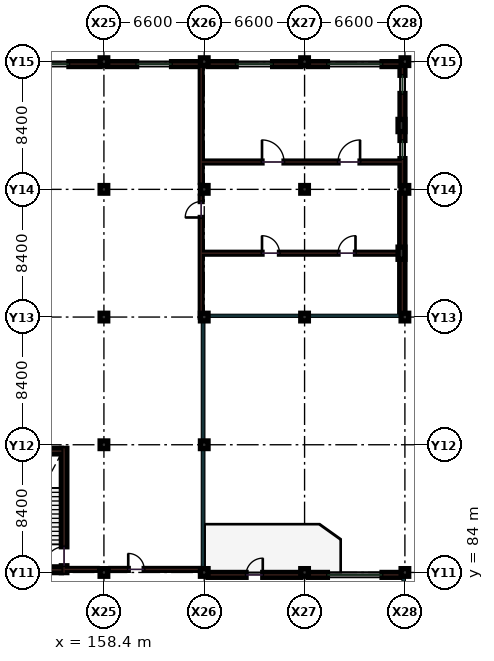
"""IFC4 building model, lengths in metres.
Left out: names, types, materials, properties, quantities, classifications, styles, units other than length and angle.
Written with IfcOpenShell. Run it as: python <this file> out.ifc"""

import sys

from ifc_helpers import new_model, si_unit, direction, frame, frame_2d, origin, origin_2d, place, context, subcontext, project, spatial, rectangle, extrude, element, fill, save


model = new_model("IFC4")
c1 = context("Model", 3, precision=1e-05, world=origin(), true_north=direction((0.0, 1.0)))
c2 = subcontext(c1, "Body", "Model", "MODEL_VIEW")
j1 = project(units=[si_unit("LENGTHUNIT", "METRE"), si_unit("PLANEANGLEUNIT", "RADIAN")], contexts=[c1])
p1 = place(None, origin())
s1 = spatial("IfcSite", under=j1, at=p1, CompositionType="ELEMENT")
p2 = place(p1, origin())
s2 = spatial("IfcBuilding", under=s1, at=p2, CompositionType="ELEMENT")
p3 = place(p2, frame((0.0, 0.0, 5.4)))
s3 = spatial("IfcBuildingStorey", under=s2, at=p3, CompositionType="ELEMENT", Elevation=5.4)
for number, where, z_axis, x_axis in (
    (1, (158.4, 84.0, 0.0), (0.0, 0.0, 1.0), (1.0, 0.0, 0.0)),
    (2, (158.4, 92.4, 0.0), (0.0, 0.0, 1.0), (1.0, 0.0, 0.0)),
    (3, (158.4, 100.8, 0.0), (0.0, 0.0, 1.0), (1.0, 0.0, 0.0)),
    (4, (158.4, 109.2, 0.0), (0.0, 0.0, 1.0), (1.0, 0.0, 0.0)),
    (5, (158.4, 117.6, 0.0), (0.0, 0.0, 1.0), (1.0, 0.0, 0.0)),
    (6, (165.0, 84.0, 0.0), (0.0, 0.0, 1.0), (1.0, 0.0, 0.0)),
    (7, (165.0, 92.4, 0.0), (0.0, 0.0, 1.0), (1.0, 0.0, 0.0)),
    (8, (165.0, 100.8, 0.0), (0.0, 0.0, 1.0), (1.0, 0.0, 0.0)),
    (9, (165.0, 109.2, 0.0), (0.0, 0.0, 1.0), (1.0, 0.0, 0.0)),
    (10, (165.0, 117.6, 0.0), (0.0, 0.0, 1.0), (1.0, 0.0, 0.0)),
    (11, (171.6, 84.0, 0.0), (0.0, 0.0, 1.0), (1.0, 0.0, 0.0)),
    (12, (171.6, 100.8, 0.0), (0.0, 0.0, 1.0), (1.0, 0.0, 0.0)),
    (13, (171.6, 109.2, 0.0), (0.0, 0.0, 1.0), (1.0, 0.0, 0.0)),
    (14, (171.6, 117.6, 0.0), (0.0, 0.0, 1.0), (1.0, 0.0, 0.0)),
    (15, (178.2, 84.0, 0.0), (0.0, 0.0, 1.0), (1.0, 0.0, 0.0)),
    (16, (178.2, 100.8, 0.0), (0.0, 0.0, 1.0), (1.0, 0.0, 0.0)),
    (17, (178.2, 109.2, 0.0), (0.0, 0.0, 1.0), (1.0, 0.0, 0.0)),
    (18, (178.2, 117.6, 0.0), (0.0, 0.0, 1.0), (1.0, 0.0, 0.0)),
):
    element("IfcColumn", number, at=place(p3, frame(where, z_axis=z_axis, x_axis=x_axis)), inside=s3, PredefinedType="COLUMN", context=c2, shape_type="SweptSolid", body=[
        extrude(rectangle(XDim=0.5, YDim=0.5, at=origin_2d()), origin(), (0.0, 0.0, 1.0), 4.5),
    ])
for number, where, z_axis, x_axis in (
    (19, (177.975, 105.0, 0.0), (0.0, 0.0, 1.0), (1.0, 0.0, 0.0)),
    (20, (177.975, 113.4, 0.0), (0.0, 0.0, 1.0), (1.0, 0.0, 0.0)),
):
    element("IfcColumn", number, at=place(p3, frame(where, z_axis=z_axis, x_axis=x_axis)), inside=s3, PredefinedType="PILASTER", context=c2, shape_type="SweptSolid", body=[
        extrude(rectangle(XDim=0.45, YDim=0.8, at=origin_2d()), origin(), (0.0, 0.0, 1.0), 4.5),
    ])
p4 = place(p3, frame((155.8, 84.2, 0.0), z_axis=(0.0, 0.0, 1.0), x_axis=(1.0, 0.0, 0.0)))
e21 = element("IfcWall", 21, at=p4, inside=s3, PredefinedType="PARTITIONING", context=c2, shape_type="SweptSolid", body=[
    extrude(rectangle(XDim=2.15, YDim=0.12, at=frame_2d((1.075, 0.0))), origin(), (0.0, 0.0, 1.0), 3.45),
])
p5 = place(p3, frame((158.85, 84.2, 0.0), z_axis=(0.0, 0.0, 1.0), x_axis=(1.0, 0.0, 0.0)))
e22 = element("IfcWall", 22, at=p5, inside=s3, PredefinedType="PARTITIONING", context=c2, shape_type="SweptSolid", body=[
    extrude(rectangle(XDim=5.83, YDim=0.12, at=frame_2d((2.915, 0.0))), origin(), (0.0, 0.0, 1.0), 3.45),
])
p6 = place(p5, frame((1.15, 0.0, 0.0)))
e23 = element("IfcOpeningElement", 23, at=p6, cuts=e22, PredefinedType="OPENING", context=c2, shape_type="SweptSolid", body=[
    extrude(rectangle(XDim=1.05, YDim=2.15, at=frame_2d((0.525, 1.075))), frame((0.0, 0.07, 0.0), z_axis=(0.0, -1.0, 0.0), x_axis=(1.0, 0.0, 0.0)), (0.0, 0.0, 1.0), 0.14),
])
p7 = place(p3, frame((164.8, 100.8, 0.0), z_axis=(0.0, 0.0, 1.0), x_axis=(0.0, 1.0, 0.0)))
e24 = element("IfcWall", 24, at=p7, inside=s3, PredefinedType="PARTITIONING", context=c2, shape_type="SweptSolid", body=[
    extrude(rectangle(XDim=7.95, YDim=0.12, at=frame_2d((3.975, 0.0))), origin(), (0.0, 0.0, 1.0), 3.45),
])
p8 = place(p7, frame((6.55, 0.0, 0.0)))
e25 = element("IfcOpeningElement", 25, at=p8, cuts=e24, PredefinedType="OPENING", context=c2, shape_type="SweptSolid", body=[
    extrude(rectangle(XDim=1.05, YDim=2.15, at=frame_2d((0.525, 1.075))), frame((0.0, 0.07, 0.0), z_axis=(0.0, -1.0, 0.0), x_axis=(1.0, 0.0, 0.0)), (0.0, 0.0, 1.0), 0.14),
])
p9 = place(p3, frame((164.8, 109.65, 0.0), z_axis=(0.0, 0.0, 1.0), x_axis=(0.0, 1.0, 0.0)))
e26 = element("IfcWall", 26, at=p9, inside=s3, PredefinedType="PARTITIONING", context=c2, shape_type="SweptSolid", body=[
    extrude(rectangle(XDim=7.63, YDim=0.12, at=frame_2d((3.815, 0.0))), origin(), (0.0, 0.0, 1.0), 3.45),
])
p10 = place(p3, frame((164.8, 105.0, 0.0), z_axis=(0.0, 0.0, 1.0), x_axis=(1.0, 0.0, 0.0)))
e27 = element("IfcWall", 27, at=p10, inside=s3, PredefinedType="PARTITIONING", context=c2, shape_type="SweptSolid", body=[
    extrude(rectangle(XDim=13.2, YDim=0.12, at=frame_2d((6.6, 0.0))), origin(), (0.0, 0.0, 1.0), 3.45),
])
p11 = place(p10, frame((4.0, 0.0, 0.0)))
e28 = element("IfcOpeningElement", 28, at=p11, cuts=e27, PredefinedType="OPENING", context=c2, shape_type="SweptSolid", body=[
    extrude(rectangle(XDim=1.15, YDim=2.2, at=frame_2d((0.575, 1.1))), frame((0.0, 0.07, 0.0), z_axis=(0.0, -1.0, 0.0), x_axis=(1.0, 0.0, 0.0)), (0.0, 0.0, 1.0), 0.14),
])
p12 = place(p10, frame((9.0, 0.0, 0.0)))
e29 = element("IfcOpeningElement", 29, at=p12, cuts=e27, PredefinedType="OPENING", context=c2, shape_type="SweptSolid", body=[
    extrude(rectangle(XDim=1.15, YDim=2.2, at=frame_2d((0.575, 1.1))), frame((0.0, 0.07, 0.0), z_axis=(0.0, -1.0, 0.0), x_axis=(1.0, 0.0, 0.0)), (0.0, 0.0, 1.0), 0.14),
])
p13 = place(p3, frame((164.8, 111.0, 0.0), z_axis=(0.0, 0.0, 1.0), x_axis=(1.0, 0.0, 0.0)))
e30 = element("IfcWall", 30, at=p13, inside=s3, PredefinedType="PARTITIONING", context=c2, shape_type="SweptSolid", body=[
    extrude(rectangle(XDim=13.2, YDim=0.12, at=frame_2d((6.6, 0.0))), origin(), (0.0, 0.0, 1.0), 3.45),
])
p14 = place(p13, frame((4.0, 0.0, 0.0)))
e31 = element("IfcOpeningElement", 31, at=p14, cuts=e30, PredefinedType="OPENING", context=c2, shape_type="SweptSolid", body=[
    extrude(rectangle(XDim=1.45, YDim=2.25, at=frame_2d((0.725, 1.125))), frame((0.0, 0.07, 0.0), z_axis=(0.0, -1.0, 0.0), x_axis=(1.0, 0.0, 0.0)), (0.0, 0.0, 1.0), 0.14),
])
p15 = place(p13, frame((9.0, 0.0, 0.0)))
e32 = element("IfcOpeningElement", 32, at=p15, cuts=e30, PredefinedType="OPENING", context=c2, shape_type="SweptSolid", body=[
    extrude(rectangle(XDim=1.45, YDim=2.25, at=frame_2d((0.725, 1.125))), frame((0.0, 0.07, 0.0), z_axis=(0.0, -1.0, 0.0), x_axis=(1.0, 0.0, 0.0)), (0.0, 0.0, 1.0), 0.14),
])
p16 = place(p3, frame((158.155, 117.44, 0.0), z_axis=(0.0, 0.0, 1.0), x_axis=(-1.0, 0.0, 0.0)))
e33 = element("IfcWall", 33, at=p16, inside=s3, PredefinedType="SOLIDWALL", context=c2, shape_type="SweptSolid", body=[
    extrude(rectangle(XDim=6.11, YDim=0.32, at=frame_2d((3.055, 0.0))), origin(), (0.0, 0.0, 1.0), 3.585),
])
p17 = place(p16, frame((2.055, 0.0, 0.95)))
e34 = element("IfcOpeningElement", 34, at=p17, cuts=e33, PredefinedType="OPENING", context=c2, shape_type="SweptSolid", body=[
    extrude(rectangle(XDim=2.0, YDim=1.95, at=frame_2d((1.0, 0.975))), frame((0.0, 0.17, 0.0), z_axis=(0.0, -1.0, 0.0), x_axis=(1.0, 0.0, 0.0)), (0.0, 0.0, 1.0), 0.34),
])
p18 = place(p3, frame((164.755, 117.44, 0.0), z_axis=(0.0, 0.0, 1.0), x_axis=(-1.0, 0.0, 0.0)))
e35 = element("IfcWall", 35, at=p18, inside=s3, PredefinedType="SOLIDWALL", context=c2, shape_type="SweptSolid", body=[
    extrude(rectangle(XDim=6.11, YDim=0.32, at=frame_2d((3.055, 0.0))), origin(), (0.0, 0.0, 1.0), 3.585),
])
p19 = place(p18, frame((1.905, 0.0, 0.95)))
e36 = element("IfcOpeningElement", 36, at=p19, cuts=e35, PredefinedType="OPENING", context=c2, shape_type="SweptSolid", body=[
    extrude(rectangle(XDim=2.3, YDim=1.95, at=frame_2d((1.15, 0.975))), frame((0.0, 0.17, 0.0), z_axis=(0.0, -1.0, 0.0), x_axis=(1.0, 0.0, 0.0)), (0.0, 0.0, 1.0), 0.34),
])
p20 = place(p3, frame((171.355, 83.84, 0.0), z_axis=(0.0, 0.0, 1.0), x_axis=(-1.0, 0.0, 0.0)))
e37 = element("IfcWall", 37, at=p20, inside=s3, PredefinedType="SOLIDWALL", context=c2, shape_type="SweptSolid", body=[
    extrude(rectangle(XDim=6.11, YDim=0.32, at=frame_2d((3.055, 0.0))), origin(), (0.0, 0.0, 1.0), 3.585),
])
p21 = place(p20, frame((2.505, 0.0, 0.0)))
e38 = element("IfcOpeningElement", 38, at=p21, cuts=e37, PredefinedType="OPENING", context=c2, shape_type="SweptSolid", body=[
    extrude(rectangle(XDim=1.1, YDim=2.2, at=frame_2d((0.55, 1.1))), frame((0.0, 0.17, 0.0), z_axis=(0.0, -1.0, 0.0), x_axis=(1.0, 0.0, 0.0)), (0.0, 0.0, 1.0), 0.34),
])
p22 = place(p3, frame((171.355, 117.44, 0.0), z_axis=(0.0, 0.0, 1.0), x_axis=(-1.0, 0.0, 0.0)))
e39 = element("IfcWall", 39, at=p22, inside=s3, PredefinedType="SOLIDWALL", context=c2, shape_type="SweptSolid", body=[
    extrude(rectangle(XDim=6.11, YDim=0.32, at=frame_2d((3.055, 0.0))), origin(), (0.0, 0.0, 1.0), 3.585),
])
p23 = place(p22, frame((1.855, 0.0, 0.95)))
e40 = element("IfcOpeningElement", 40, at=p23, cuts=e39, PredefinedType="OPENING", context=c2, shape_type="SweptSolid", body=[
    extrude(rectangle(XDim=2.4, YDim=1.6, at=frame_2d((1.2, 0.8))), frame((0.0, 0.17, 0.0), z_axis=(0.0, -1.0, 0.0), x_axis=(1.0, 0.0, 0.0)), (0.0, 0.0, 1.0), 0.34),
])
p24 = place(p3, frame((177.955, 83.84, 0.0), z_axis=(0.0, 0.0, 1.0), x_axis=(-1.0, 0.0, 0.0)))
e41 = element("IfcWall", 41, at=p24, inside=s3, PredefinedType="SOLIDWALL", context=c2, shape_type="SweptSolid", body=[
    extrude(rectangle(XDim=6.11, YDim=0.32, at=frame_2d((3.055, 0.0))), origin(), (0.0, 0.0, 1.0), 3.585),
])
p25 = place(p24, frame((1.255, 0.0, 0.95)))
e42 = element("IfcOpeningElement", 42, at=p25, cuts=e41, PredefinedType="OPENING", context=c2, shape_type="SweptSolid", body=[
    extrude(rectangle(XDim=3.6, YDim=2.0, at=frame_2d((1.8, 1.0))), frame((0.0, 0.17, 0.0), z_axis=(0.0, -1.0, 0.0), x_axis=(1.0, 0.0, 0.0)), (0.0, 0.0, 1.0), 0.34),
])
p26 = place(p3, frame((178.03, 101.045, 0.0), z_axis=(0.0, 0.0, 1.0), x_axis=(0.0, 1.0, 0.0)))
e43 = element("IfcWall", 43, at=p26, inside=s3, PredefinedType="SHEAR", context=c2, shape_type="SweptSolid", body=[
    extrude(rectangle(XDim=7.91, YDim=0.34, at=frame_2d((3.955, 0.0))), origin(), (0.0, 0.0, 1.0), 4.2),
])
p27 = place(p3, frame((178.04, 109.445, 0.0), z_axis=(0.0, 0.0, 1.0), x_axis=(0.0, 1.0, 0.0)))
e44 = element("IfcWall", 44, at=p27, inside=s3, PredefinedType="SOLIDWALL", context=c2, shape_type="SweptSolid", body=[
    extrude(rectangle(XDim=7.91, YDim=0.32, at=frame_2d((3.955, 0.0))), origin(), (0.0, 0.0, 1.0), 3.635),
])
p28 = place(p27, frame((1.775, 0.0, 0.95)))
e45 = element("IfcOpeningElement", 45, at=p28, cuts=e44, PredefinedType="OPENING", context=c2, shape_type="SweptSolid", body=[
    extrude(rectangle(XDim=1.2, YDim=1.5, at=frame_2d((0.6, 0.75))), frame((0.0, 0.17, 0.0), z_axis=(0.0, -1.0, 0.0), x_axis=(1.0, 0.0, 0.0)), (0.0, 0.0, 1.0), 0.34),
])
p29 = place(p27, frame((6.06, 0.0, 0.95)))
e46 = element("IfcOpeningElement", 46, at=p29, cuts=e44, PredefinedType="OPENING", context=c2, shape_type="SweptSolid", body=[
    extrude(rectangle(XDim=1.2, YDim=1.5, at=frame_2d((0.6, 0.75))), frame((0.0, 0.17, 0.0), z_axis=(0.0, -1.0, 0.0), x_axis=(1.0, 0.0, 0.0)), (0.0, 0.0, 1.0), 0.34),
])
p30 = place(p3, frame((177.955, 117.44, 0.0), z_axis=(0.0, 0.0, 1.0), x_axis=(-1.0, 0.0, 0.0)))
e47 = element("IfcWall", 47, at=p30, inside=s3, PredefinedType="SOLIDWALL", context=c2, shape_type="SweptSolid", body=[
    extrude(rectangle(XDim=6.11, YDim=0.32, at=frame_2d((3.055, 0.0))), origin(), (0.0, 0.0, 1.0), 3.585),
])
p31 = place(p30, frame((1.255, 0.0, 0.95)))
e48 = element("IfcOpeningElement", 48, at=p31, cuts=e47, PredefinedType="OPENING", context=c2, shape_type="SweptSolid", body=[
    extrude(rectangle(XDim=3.6, YDim=2.0, at=frame_2d((1.8, 1.0))), frame((0.0, 0.17, 0.0), z_axis=(0.0, -1.0, 0.0), x_axis=(1.0, 0.0, 0.0)), (0.0, 0.0, 1.0), 0.34),
])
p32 = place(p3, frame((155.78, 83.99, 0.0), z_axis=(0.0, 0.0, 1.0), x_axis=(0.0, 1.0, 0.0)))
e49 = element("IfcWall", 49, at=p32, inside=s3, PredefinedType="SHEAR", context=c2, shape_type="SweptSolid", body=[
    extrude(rectangle(XDim=8.17, YDim=0.36, at=frame_2d((4.085, 0.0))), origin(), (0.0, 0.0, 1.0), 4.2),
])
p33 = place(p32, frame((0.45, 0.0, 0.0)))
e50 = element("IfcOpeningElement", 50, at=p33, cuts=e49, PredefinedType="OPENING", context=c2, shape_type="SweptSolid", body=[
    extrude(rectangle(XDim=1.25, YDim=2.15, at=frame_2d((0.625, 1.075))), frame((0.0, 0.19, 0.0), z_axis=(0.0, -1.0, 0.0), x_axis=(1.0, 0.0, 0.0)), (0.0, 0.0, 1.0), 0.38),
])
for number, where, z_axis, x_axis in (
    (51, (152.4, 91.98, 0.0), (0.0, 0.0, 1.0), (1.0, 0.0, 0.0)),
    (52, (152.4, 84.17, 0.0), (0.0, 0.0, 1.0), (1.0, 0.0, 0.0)),
):
    element("IfcWall", number, at=place(p3, frame(where, z_axis=z_axis, x_axis=x_axis)), inside=s3, PredefinedType="SHEAR", context=c2, shape_type="SweptSolid", body=[
        extrude(rectangle(XDim=3.2, YDim=0.36, at=frame_2d((1.6, 0.0))), origin(), (0.0, 0.0, 1.0), 4.2),
    ])
p34 = place(p6, origin())
e53 = element("IfcDoor", 53, at=p34, inside=s3, OperationType="SINGLE_SWING_LEFT", PredefinedType="DOOR", context=c2, shape_type="SweptSolid", body=[
    extrude(rectangle(XDim=1.05, YDim=2.15, at=frame_2d((0.525, 1.075))), frame((0.0, 0.025, 0.0), z_axis=(0.0, -1.0, 0.0), x_axis=(1.0, 0.0, 0.0)), (0.0, 0.0, 1.0), 0.05),
])
fill(e23, e53)
p35 = place(p8, origin())
e54 = element("IfcDoor", 54, at=p35, inside=s3, OperationType="SINGLE_SWING_LEFT", PredefinedType="DOOR", context=c2, shape_type="SweptSolid", body=[
    extrude(rectangle(XDim=1.05, YDim=2.15, at=frame_2d((0.525, 1.075))), frame((0.0, 0.025, 0.0), z_axis=(0.0, -1.0, 0.0), x_axis=(1.0, 0.0, 0.0)), (0.0, 0.0, 1.0), 0.05),
])
fill(e25, e54)
p36 = place(p11, origin())
e55 = element("IfcDoor", 55, at=p36, inside=s3, OperationType="SINGLE_SWING_LEFT", PredefinedType="DOOR", context=c2, shape_type="SweptSolid", body=[
    extrude(rectangle(XDim=1.15, YDim=2.2, at=frame_2d((0.575, 1.1))), frame((0.0, 0.025, 0.0), z_axis=(0.0, -1.0, 0.0), x_axis=(1.0, 0.0, 0.0)), (0.0, 0.0, 1.0), 0.05),
])
fill(e28, e55)
p37 = place(p12, origin())
e56 = element("IfcDoor", 56, at=p37, inside=s3, OperationType="SINGLE_SWING_RIGHT", PredefinedType="DOOR", context=c2, shape_type="SweptSolid", body=[
    extrude(rectangle(XDim=1.15, YDim=2.2, at=frame_2d((0.575, 1.1))), frame((0.0, 0.025, 0.0), z_axis=(0.0, -1.0, 0.0), x_axis=(1.0, 0.0, 0.0)), (0.0, 0.0, 1.0), 0.05),
])
fill(e29, e56)
p38 = place(p14, origin())
e57 = element("IfcDoor", 57, at=p38, inside=s3, OperationType="SINGLE_SWING_LEFT", PredefinedType="DOOR", context=c2, shape_type="SweptSolid", body=[
    extrude(rectangle(XDim=1.45, YDim=2.25, at=frame_2d((0.725, 1.125))), frame((0.0, 0.025, 0.0), z_axis=(0.0, -1.0, 0.0), x_axis=(1.0, 0.0, 0.0)), (0.0, 0.0, 1.0), 0.05),
])
fill(e31, e57)
p39 = place(p15, origin())
e58 = element("IfcDoor", 58, at=p39, inside=s3, OperationType="SINGLE_SWING_RIGHT", PredefinedType="DOOR", context=c2, shape_type="SweptSolid", body=[
    extrude(rectangle(XDim=1.45, YDim=2.25, at=frame_2d((0.725, 1.125))), frame((0.0, 0.025, 0.0), z_axis=(0.0, -1.0, 0.0), x_axis=(1.0, 0.0, 0.0)), (0.0, 0.0, 1.0), 0.05),
])
fill(e32, e58)
p40 = place(p17, origin())
e59 = element("IfcWindow", 59, at=p40, inside=s3, PartitioningType="SINGLE_PANEL", PredefinedType="WINDOW", context=c2, shape_type="SweptSolid", body=[
    extrude(rectangle(XDim=2.0, YDim=1.95, at=frame_2d((1.0, 0.975))), frame((0.0, 0.03, 0.0), z_axis=(0.0, -1.0, 0.0), x_axis=(1.0, 0.0, 0.0)), (0.0, 0.0, 1.0), 0.06),
])
fill(e34, e59)
p41 = place(p19, origin())
e60 = element("IfcWindow", 60, at=p41, inside=s3, PartitioningType="SINGLE_PANEL", PredefinedType="WINDOW", context=c2, shape_type="SweptSolid", body=[
    extrude(rectangle(XDim=2.3, YDim=1.95, at=frame_2d((1.15, 0.975))), frame((0.0, 0.03, 0.0), z_axis=(0.0, -1.0, 0.0), x_axis=(1.0, 0.0, 0.0)), (0.0, 0.0, 1.0), 0.06),
])
fill(e36, e60)
p42 = place(p21, frame((1.1, 0.0, 0.0), z_axis=(0.0, 0.0, 1.0), x_axis=(-1.0, 0.0, 0.0)))
e61 = element("IfcDoor", 61, at=p42, inside=s3, OperationType="SINGLE_SWING_LEFT", PredefinedType="DOOR", context=c2, shape_type="SweptSolid", body=[
    extrude(rectangle(XDim=1.1, YDim=2.2, at=frame_2d((0.55, 1.1))), frame((0.0, 0.025, 0.0), z_axis=(0.0, -1.0, 0.0), x_axis=(1.0, 0.0, 0.0)), (0.0, 0.0, 1.0), 0.05),
])
fill(e38, e61)
p43 = place(p23, origin())
e62 = element("IfcWindow", 62, at=p43, inside=s3, PartitioningType="SINGLE_PANEL", PredefinedType="WINDOW", context=c2, shape_type="SweptSolid", body=[
    extrude(rectangle(XDim=2.4, YDim=1.6, at=frame_2d((1.2, 0.8))), frame((0.0, 0.03, 0.0), z_axis=(0.0, -1.0, 0.0), x_axis=(1.0, 0.0, 0.0)), (0.0, 0.0, 1.0), 0.06),
])
fill(e40, e62)
p44 = place(p25, origin())
e63 = element("IfcWindow", 63, at=p44, inside=s3, PartitioningType="SINGLE_PANEL", PredefinedType="WINDOW", context=c2, shape_type="SweptSolid", body=[
    extrude(rectangle(XDim=3.6, YDim=2.0, at=frame_2d((1.8, 1.0))), frame((0.0, 0.03, 0.0), z_axis=(0.0, -1.0, 0.0), x_axis=(1.0, 0.0, 0.0)), (0.0, 0.0, 1.0), 0.06),
])
fill(e42, e63)
p45 = place(p28, origin())
e64 = element("IfcWindow", 64, at=p45, inside=s3, PartitioningType="SINGLE_PANEL", PredefinedType="WINDOW", context=c2, shape_type="SweptSolid", body=[
    extrude(rectangle(XDim=1.2, YDim=1.5, at=frame_2d((0.6, 0.75))), frame((0.0, 0.03, 0.0), z_axis=(0.0, -1.0, 0.0), x_axis=(1.0, 0.0, 0.0)), (0.0, 0.0, 1.0), 0.06),
])
fill(e45, e64)
p46 = place(p29, origin())
e65 = element("IfcWindow", 65, at=p46, inside=s3, PartitioningType="SINGLE_PANEL", PredefinedType="WINDOW", context=c2, shape_type="SweptSolid", body=[
    extrude(rectangle(XDim=1.2, YDim=1.5, at=frame_2d((0.6, 0.75))), frame((0.0, 0.03, 0.0), z_axis=(0.0, -1.0, 0.0), x_axis=(1.0, 0.0, 0.0)), (0.0, 0.0, 1.0), 0.06),
])
fill(e46, e65)
p47 = place(p31, origin())
e66 = element("IfcWindow", 66, at=p47, inside=s3, PartitioningType="SINGLE_PANEL", PredefinedType="WINDOW", context=c2, shape_type="SweptSolid", body=[
    extrude(rectangle(XDim=3.6, YDim=2.0, at=frame_2d((1.8, 1.0))), frame((0.0, 0.03, 0.0), z_axis=(0.0, -1.0, 0.0), x_axis=(1.0, 0.0, 0.0)), (0.0, 0.0, 1.0), 0.06),
])
fill(e48, e66)
p48 = place(p33, origin())
e67 = element("IfcDoor", 67, at=p48, inside=s3, OperationType="SINGLE_SWING_LEFT", PredefinedType="DOOR", context=c2, shape_type="SweptSolid", body=[
    extrude(rectangle(XDim=1.25, YDim=2.15, at=frame_2d((0.625, 1.075))), frame((0.0, 0.025, 0.0), z_axis=(0.0, -1.0, 0.0), x_axis=(1.0, 0.0, 0.0)), (0.0, 0.0, 1.0), 0.05),
])
fill(e50, e67)
save(model, sys.argv[1])
